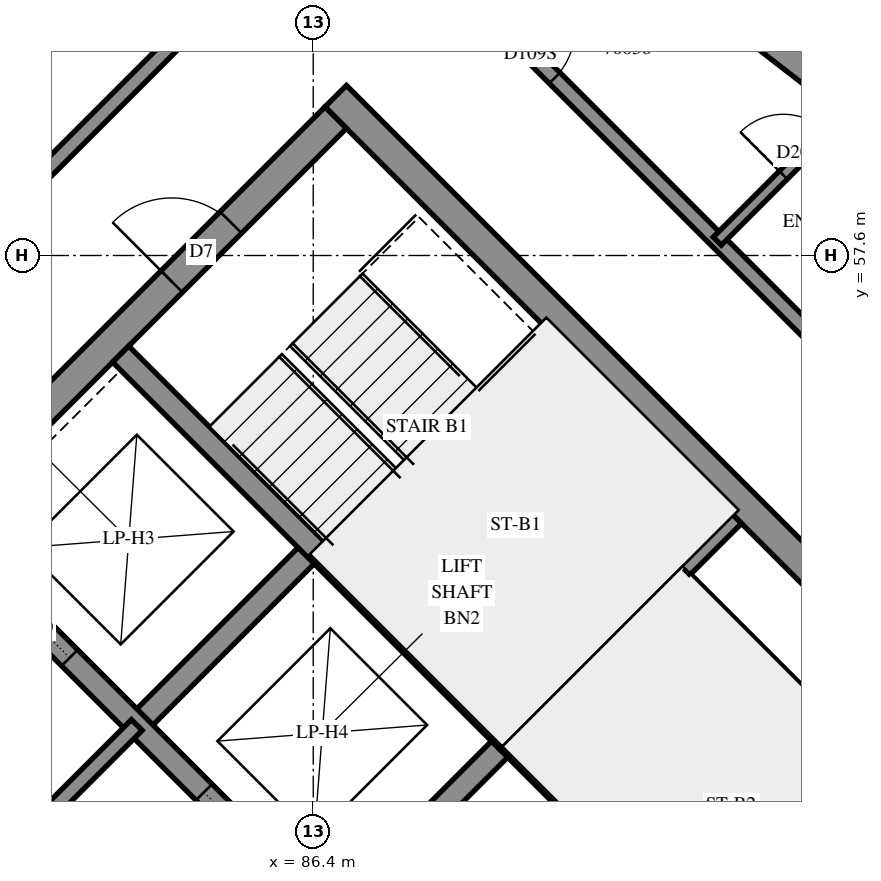
"""IFC4 building model, lengths in metres.
Left out: names, types, materials, properties, quantities, classifications, styles, units other than length and angle.
Written with IfcOpenShell. Run it as: python <this file> out.ifc"""

import sys

from ifc_helpers import new_model, si_unit, direction, frame, frame_2d, origin, place, context, subcontext, project, spatial, polyline, rectangle, outline, extrude, element, fill, save


model = new_model("IFC4")
c1 = context("Model", 3, precision=1e-05, world=origin(), true_north=direction((0.0, 1.0)))
c2 = subcontext(c1, "Body", "Model", "MODEL_VIEW")
j1 = project(units=[si_unit("LENGTHUNIT", "METRE"), si_unit("PLANEANGLEUNIT", "RADIAN")], contexts=[c1])
p1 = place(None, origin())
s1 = spatial("IfcSite", under=j1, at=p1, CompositionType="ELEMENT")
p2 = place(p1, origin())
s2 = spatial("IfcBuilding", under=s1, at=p2, CompositionType="ELEMENT")
p3 = place(p2, frame((0.0, 0.0, 257.4)))
s3 = spatial("IfcBuildingStorey", under=s2, at=p3, CompositionType="ELEMENT", Elevation=257.4)
p4 = place(p3, frame((86.695, 59.696, -0.3), z_axis=(0.0, 0.0, 1.0), x_axis=(0.7071100706, -0.7071034917, 0.0)))
e1 = element("IfcWall", 1, at=p4, inside=s3, PredefinedType="SHEAR", context=c2, shape_type="SweptSolid", body=[
    extrude(rectangle(XDim=15.2, YDim=0.4, at=frame_2d((7.6, 0.0))), origin(), (0.0, 0.0, 1.0), 2.7),
])
p5 = place(p4, frame((10.4, 0.0, 0.3)))
e2 = element("IfcOpeningElement", 2, at=p5, cuts=e1, PredefinedType="OPENING", context=c2, shape_type="SweptSolid", body=[
    extrude(rectangle(XDim=0.8, YDim=2.1, at=frame_2d((0.4, 1.05))), frame((0.0, 0.21, 0.0), z_axis=(0.0, -1.0, 0.0), x_axis=(1.0, 0.0, 0.0)), (0.0, 0.0, 1.0), 0.42),
])
p6 = place(p3, frame((76.513, 49.231, -0.3), z_axis=(0.0, 0.0, 1.0), x_axis=(0.7071067812, 0.7071067812, 0.0)))
e3 = element("IfcWall", 3, at=p6, inside=s3, PredefinedType="SHEAR", context=c2, shape_type="SweptSolid", body=[
    extrude(rectangle(XDim=14.4, YDim=0.4, at=frame_2d((7.2, 0.0))), origin(), (0.0, 0.0, 1.0), 2.7),
])
p7 = place(p6, frame((4.55, 0.0, 0.3)))
e4 = element("IfcOpeningElement", 4, at=p7, cuts=e3, PredefinedType="OPENING", context=c2, shape_type="SweptSolid", body=[
    extrude(rectangle(XDim=1.1, YDim=2.1, at=frame_2d((0.55, 1.05))), frame((0.0, 0.21, 0.0), z_axis=(0.0, -1.0, 0.0), x_axis=(1.0, 0.0, 0.0)), (0.0, 0.0, 1.0), 0.42),
])
p8 = place(p6, frame((11.35, 0.0, 0.3)))
e5 = element("IfcOpeningElement", 5, at=p8, cuts=e3, PredefinedType="OPENING", context=c2, shape_type="SweptSolid", body=[
    extrude(rectangle(XDim=1.1, YDim=2.1, at=frame_2d((0.55, 1.05))), frame((0.0, 0.21, 0.0), z_axis=(0.0, -1.0, 0.0), x_axis=(1.0, 0.0, 0.0)), (0.0, 0.0, 1.0), 0.42),
])
p9 = place(p3, frame((84.079, 51.423, 0.0), z_axis=(0.0, 0.0, 1.0), x_axis=(0.7071219326, 0.7070916295, 0.0)))
e6 = element("IfcWall", 6, at=p9, inside=s3, PredefinedType="SOLIDWALL", context=c2, shape_type="SweptSolid", body=[
    extrude(rectangle(XDim=3.3, YDim=0.3, at=frame_2d((1.65, 0.0))), origin(), (0.0, 0.0, 1.0), 3.1),
])
p10 = place(p3, frame((86.625, 48.878, 0.0), z_axis=(0.0, 0.0, 1.0), x_axis=(0.7071067812, 0.7071067812, 0.0)))
e7 = element("IfcWall", 7, at=p10, inside=s3, PredefinedType="SOLIDWALL", context=c2, shape_type="SweptSolid", body=[
    extrude(rectangle(XDim=3.3, YDim=0.3, at=frame_2d((1.65, 0.0))), origin(), (0.0, 0.0, 1.0), 3.1),
])
p11 = place(p3, frame((78.988, 51.423, 0.0), z_axis=(0.0, 0.0, 1.0), x_axis=(0.7071067812, -0.7071067812, 0.0)))
e8 = element("IfcWall", 8, at=p11, inside=s3, PredefinedType="SOLIDWALL", context=c2, shape_type="SweptSolid", body=[
    extrude(rectangle(XDim=14.4, YDim=0.3, at=frame_2d((7.2, 0.0))), origin(), (0.0, 0.0, 1.0), 3.1),
])
p12 = place(p11, frame((1.35, 0.0, 0.0)))
e9 = element("IfcOpeningElement", 9, at=p12, cuts=e8, PredefinedType="OPENING", context=c2, shape_type="SweptSolid", body=[
    extrude(rectangle(XDim=0.9, YDim=2.1, at=frame_2d((0.45, 1.05))), frame((0.0, 0.16, 0.0), z_axis=(0.0, -1.0, 0.0), x_axis=(1.0, 0.0, 0.0)), (0.0, 0.0, 1.0), 0.32),
])
p13 = place(p11, frame((4.95, 0.0, 0.0)))
e10 = element("IfcOpeningElement", 10, at=p13, cuts=e8, PredefinedType="OPENING", context=c2, shape_type="SweptSolid", body=[
    extrude(rectangle(XDim=0.9, YDim=2.1, at=frame_2d((0.45, 1.05))), frame((0.0, 0.16, 0.0), z_axis=(0.0, -1.0, 0.0), x_axis=(1.0, 0.0, 0.0)), (0.0, 0.0, 1.0), 0.32),
])
p14 = place(p11, frame((8.55, 0.0, 0.0)))
e11 = element("IfcOpeningElement", 11, at=p14, cuts=e8, PredefinedType="OPENING", context=c2, shape_type="SweptSolid", body=[
    extrude(rectangle(XDim=0.9, YDim=2.1, at=frame_2d((0.45, 1.05))), frame((0.0, 0.16, 0.0), z_axis=(0.0, -1.0, 0.0), x_axis=(1.0, 0.0, 0.0)), (0.0, 0.0, 1.0), 0.32),
])
p15 = place(p11, frame((12.05, 0.0, 0.0)))
e12 = element("IfcOpeningElement", 12, at=p15, cuts=e8, PredefinedType="OPENING", context=c2, shape_type="SweptSolid", body=[
    extrude(rectangle(XDim=1.1, YDim=2.1, at=frame_2d((0.55, 1.05))), frame((0.0, 0.16, 0.0), z_axis=(0.0, -1.0, 0.0), x_axis=(1.0, 0.0, 0.0)), (0.0, 0.0, 1.0), 0.32),
])
p16 = place(p3, frame((81.534, 53.969, 0.0), z_axis=(0.0, 0.0, 1.0), x_axis=(0.707103309, -0.7071102534, 0.0)))
e13 = element("IfcWall", 13, at=p16, inside=s3, PredefinedType="SOLIDWALL", context=c2, shape_type="SweptSolid", body=[
    extrude(rectangle(XDim=14.4, YDim=0.3, at=frame_2d((7.2, 0.0))), origin(), (0.0, 0.0, 1.0), 3.1),
])
p17 = place(p16, frame((8.55, 0.0, 0.0)))
e14 = element("IfcOpeningElement", 14, at=p17, cuts=e13, PredefinedType="OPENING", context=c2, shape_type="SweptSolid", body=[
    extrude(rectangle(XDim=0.9, YDim=2.1, at=frame_2d((0.45, 1.05))), frame((0.0, 0.16, 0.0), z_axis=(0.0, -1.0, 0.0), x_axis=(1.0, 0.0, 0.0)), (0.0, 0.0, 1.0), 0.32),
])
p18 = place(p16, frame((1.25, 0.0, 0.0)))
e15 = element("IfcOpeningElement", 15, at=p18, cuts=e13, PredefinedType="OPENING", context=c2, shape_type="SweptSolid", body=[
    extrude(rectangle(XDim=1.1, YDim=2.1, at=frame_2d((0.55, 1.05))), frame((0.0, 0.16, 0.0), z_axis=(0.0, -1.0, 0.0), x_axis=(1.0, 0.0, 0.0)), (0.0, 0.0, 1.0), 0.32),
])
p19 = place(p16, frame((4.85, 0.0, 0.0)))
e16 = element("IfcOpeningElement", 16, at=p19, cuts=e13, PredefinedType="OPENING", context=c2, shape_type="SweptSolid", body=[
    extrude(rectangle(XDim=1.1, YDim=2.1, at=frame_2d((0.55, 1.05))), frame((0.0, 0.16, 0.0), z_axis=(0.0, -1.0, 0.0), x_axis=(1.0, 0.0, 0.0)), (0.0, 0.0, 1.0), 0.32),
])
p20 = place(p16, frame((12.05, 0.0, 0.0)))
e17 = element("IfcOpeningElement", 17, at=p20, cuts=e13, PredefinedType="OPENING", context=c2, shape_type="SweptSolid", body=[
    extrude(rectangle(XDim=1.1, YDim=2.1, at=frame_2d((0.55, 1.05))), frame((0.0, 0.16, 0.0), z_axis=(0.0, -1.0, 0.0), x_axis=(1.0, 0.0, 0.0)), (0.0, 0.0, 1.0), 0.32),
])
for number, where, z_axis, x_axis in (
    (18, (83.867, 56.302, 0.0), (0.0, 0.0, 1.0), (0.707, -0.707, 0.0)),
    (19, (88.958, 51.211, 0.0), (0.0, 0.0, 1.0), (0.707, -0.707, 0.0)),
):
    element("IfcWall", number, at=place(p3, frame(where, z_axis=z_axis, x_axis=x_axis)), inside=s3, PredefinedType="SOLIDWALL", context=c2, shape_type="SweptSolid", body=[
        extrude(rectangle(XDim=7.2, YDim=0.3, at=frame_2d((3.6, 0.0))), origin(), (0.0, 0.0, 1.0), 3.1),
    ])
p21 = place(p3, frame((88.958, 51.211, 0.0), z_axis=(0.0, 0.0, 1.0), x_axis=(0.7071067812, 0.7071067812, 0.0)))
e20 = element("IfcWall", 20, at=p21, inside=s3, PredefinedType="SOLIDWALL", context=c2, shape_type="SweptSolid", body=[
    extrude(rectangle(XDim=4.2, YDim=0.3, at=frame_2d((2.1, 0.0))), origin(), (0.0, 0.0, 1.0), 3.1),
])
p22 = place(p3, frame((93.672, 59.5, 0.0), z_axis=(0.0, 0.0, 1.0), x_axis=(-0.790158, 0.612903202, 0.0)))
e21 = element("IfcWall", 21, at=p22, inside=s3, PredefinedType="SOLIDWALL", context=c2, shape_type="SweptSolid", body=[
    extrude(outline(polyline([(-0.028, -0.225), (3.33, -0.225), (3.387, 0.225), (0.028, 0.225), (-0.028, -0.225)])), origin(), (0.0, 0.0, 1.0), 3.1),
])
p23 = place(p22, frame((1.52, 0.0, 0.45)))
e22 = element("IfcOpeningElement", 22, at=p23, cuts=e21, PredefinedType="OPENING", context=c2, shape_type="SweptSolid", body=[
    extrude(rectangle(XDim=1.2, YDim=2.55, at=frame_2d((0.6, 1.275))), frame((0.0, 0.235, 0.0), z_axis=(0.0, -1.0, 0.0), x_axis=(1.0, 0.0, 0.0)), (0.0, 0.0, 1.0), 0.47),
])
p24 = place(p3, frame((91.313, 53.354, 0.0), z_axis=(0.0, 0.0, 1.0), x_axis=(0.7071140275, -0.7070995348, 0.0)))
e23 = element("IfcWall", 23, at=p24, inside=s3, PredefinedType="PARTITIONING", context=c2, shape_type="SweptSolid", body=[
    extrude(rectangle(XDim=6.9, YDim=0.15, at=frame_2d((3.45, 0.0))), origin(), (0.0, 0.0, 1.0), 3.1),
])
p25 = place(p3, frame((81.534, 48.878, 0.0), z_axis=(0.0, 0.0, 1.0), x_axis=(0.707092892, 0.7071206701, 0.0)))
e24 = element("IfcWall", 24, at=p25, inside=s3, PredefinedType="PARTITIONING", context=c2, shape_type="SweptSolid", body=[
    extrude(rectangle(XDim=3.6, YDim=0.2, at=frame_2d((1.8, 0.0))), origin(), (0.0, 0.0, 1.0), 3.1),
])
p26 = place(p3, frame((81.182, 58.704, 0.0), z_axis=(0.0, 0.0, 1.0), x_axis=(0.7069952238, 0.707218321, 0.0)))
e25 = element("IfcWall", 25, at=p26, inside=s3, PredefinedType="PARTITIONING", context=c2, shape_type="SweptSolid", body=[
    extrude(rectangle(XDim=8.965, YDim=0.2, at=frame_2d((4.482, 0.0))), origin(), (0.0, 0.0, 1.0), 3.1),
])
p27 = place(p3, frame((82.028, 57.858, 0.0), z_axis=(0.0, 0.0, 1.0), x_axis=(0.7071067812, 0.7071067812, 0.0)))
e26 = element("IfcWall", 26, at=p27, inside=s3, PredefinedType="PARTITIONING", context=c2, shape_type="SweptSolid", body=[
    extrude(rectangle(XDim=6.8, YDim=0.2, at=frame_2d((3.4, 0.0))), origin(), (0.0, 0.0, 1.0), 3.1),
])
p28 = place(p27, frame((0.211, 0.0, 0.0)))
e27 = element("IfcOpeningElement", 27, at=p28, cuts=e26, PredefinedType="OPENING", context=c2, shape_type="SweptSolid", body=[
    extrude(rectangle(XDim=1.0, YDim=2.1, at=frame_2d((0.5, 1.05))), frame((0.0, 0.11, 0.0), z_axis=(0.0, -1.0, 0.0), x_axis=(1.0, 0.0, 0.0)), (0.0, 0.0, 1.0), 0.22),
])
p29 = place(p3, frame((88.537, 60.973, 0.0), z_axis=(0.0, 0.0, 1.0), x_axis=(0.7071067812, -0.7071067812, 0.0)))
e28 = element("IfcWall", 28, at=p29, inside=s3, PredefinedType="PARTITIONING", context=c2, shape_type="SweptSolid", body=[
    extrude(rectangle(XDim=6.401, YDim=0.2, at=frame_2d((3.2, 0.0))), origin(), (0.0, 0.0, 1.0), 3.1),
])
p30 = place(p29, frame((0.569, 0.0, 0.0)))
e29 = element("IfcOpeningElement", 29, at=p30, cuts=e28, PredefinedType="OPENING", context=c2, shape_type="SweptSolid", body=[
    extrude(rectangle(XDim=0.9, YDim=2.1, at=frame_2d((0.45, 1.05))), frame((0.0, 0.11, 0.0), z_axis=(0.0, -1.0, 0.0), x_axis=(1.0, 0.0, 0.0)), (0.0, 0.0, 1.0), 0.22),
])
p31 = place(p3, frame((91.716, 57.788, 0.0), z_axis=(0.0, 0.0, 1.0), x_axis=(0.7071067812, 0.7071067812, 0.0)))
e30 = element("IfcWall", 30, at=p31, inside=s3, PredefinedType="PARTITIONING", context=c2, shape_type="SweptSolid", body=[
    extrude(rectangle(XDim=2.345, YDim=0.15, at=frame_2d((1.172, 0.0))), origin(), (0.0, 0.0, 1.0), 3.1),
])
p32 = place(p31, frame((1.23, 0.0, 0.0)))
e31 = element("IfcOpeningElement", 31, at=p32, cuts=e30, PredefinedType="OPENING", context=c2, shape_type="SweptSolid", body=[
    extrude(rectangle(XDim=0.8, YDim=2.1, at=frame_2d((0.4, 1.05))), frame((0.0, 0.085, 0.0), z_axis=(0.0, -1.0, 0.0), x_axis=(1.0, 0.0, 0.0)), (0.0, 0.0, 1.0), 0.17),
])
p33 = place(p23, origin())
e32 = element("IfcWindow", 32, at=p33, inside=s3, PartitioningType="SINGLE_PANEL", PredefinedType="WINDOW", context=c2, shape_type="SweptSolid", body=[
    extrude(rectangle(XDim=1.2, YDim=2.55, at=frame_2d((0.6, 1.275))), frame((0.0, 0.205, 0.0), z_axis=(0.0, -1.0, 0.0), x_axis=(1.0, 0.0, 0.0)), (0.0, 0.0, 1.0), 0.06),
])
fill(e22, e32)
p34 = place(p8, origin())
e33 = element("IfcDoor", 33, at=p34, inside=s3, OperationType="SINGLE_SWING_LEFT", PredefinedType="DOOR", context=c2, shape_type="SweptSolid", body=[
    extrude(rectangle(XDim=1.1, YDim=2.1, at=frame_2d((0.55, 1.05))), frame((0.0, 0.025, 0.0), z_axis=(0.0, -1.0, 0.0), x_axis=(1.0, 0.0, 0.0)), (0.0, 0.0, 1.0), 0.05),
])
fill(e5, e33)
p35 = place(p18, origin())
e34 = element("IfcDoor", 34, at=p35, inside=s3, OperationType="SLIDING_TO_LEFT", PredefinedType="DOOR", context=c2, shape_type="SweptSolid", body=[
    extrude(rectangle(XDim=1.1, YDim=2.1, at=frame_2d((0.55, 1.05))), frame((0.0, 0.025, 0.0), z_axis=(0.0, -1.0, 0.0), x_axis=(1.0, 0.0, 0.0)), (0.0, 0.0, 1.0), 0.05),
])
fill(e15, e34)
p36 = place(p19, origin())
e35 = element("IfcDoor", 35, at=p36, inside=s3, OperationType="SLIDING_TO_RIGHT", PredefinedType="DOOR", context=c2, shape_type="SweptSolid", body=[
    extrude(rectangle(XDim=1.1, YDim=2.1, at=frame_2d((0.55, 1.05))), frame((0.0, 0.025, 0.0), z_axis=(0.0, -1.0, 0.0), x_axis=(1.0, 0.0, 0.0)), (0.0, 0.0, 1.0), 0.05),
])
fill(e16, e35)
p37 = place(p30, origin())
e36 = element("IfcDoor", 36, at=p37, inside=s3, OperationType="SINGLE_SWING_LEFT", PredefinedType="DOOR", context=c2, shape_type="SweptSolid", body=[
    extrude(rectangle(XDim=0.9, YDim=2.1, at=frame_2d((0.45, 1.05))), frame((0.0, 0.025, 0.0), z_axis=(0.0, -1.0, 0.0), x_axis=(1.0, 0.0, 0.0)), (0.0, 0.0, 1.0), 0.05),
])
fill(e29, e36)
p38 = place(p32, origin())
e37 = element("IfcDoor", 37, at=p38, inside=s3, OperationType="SINGLE_SWING_RIGHT", PredefinedType="DOOR", context=c2, shape_type="SweptSolid", body=[
    extrude(rectangle(XDim=0.8, YDim=2.1, at=frame_2d((0.4, 1.05))), frame((0.0, 0.025, 0.0), z_axis=(0.0, -1.0, 0.0), x_axis=(1.0, 0.0, 0.0)), (0.0, 0.0, 1.0), 0.05),
])
fill(e31, e37)
save(model, sys.argv[1])
